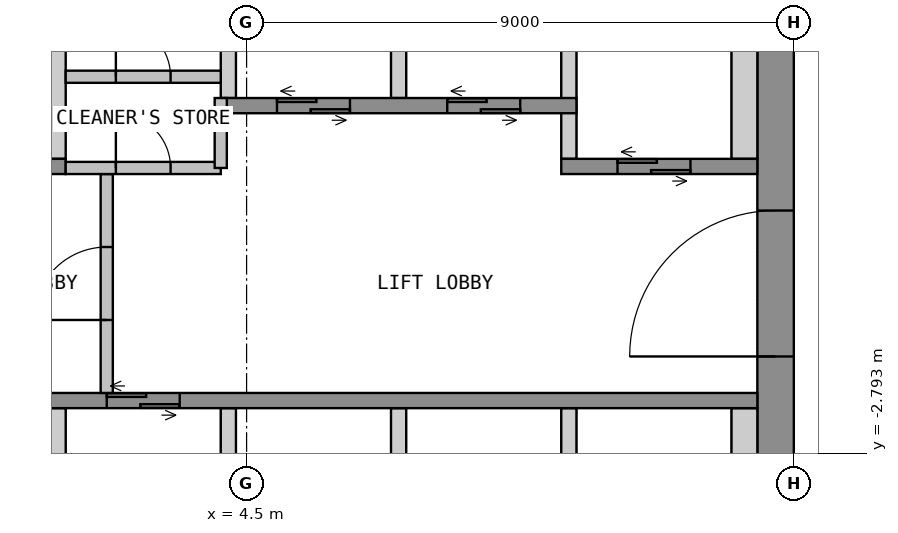
"""IFC4 building model, lengths in metres.
Left out: names, types, materials, properties, quantities, classifications, styles, units other than length and angle.
Written with IfcOpenShell. Run it as: python <this file> out.ifc"""

import sys

from ifc_helpers import new_model, si_unit, direction, frame, frame_2d, origin, place, context, subcontext, project, spatial, polyline, rectangle, outline, extrude, element, fill, save


model = new_model("IFC4")
c1 = context("Model", 3, precision=1e-05, world=origin(), true_north=direction((0.0, 1.0)))
c2 = subcontext(c1, "Body", "Model", "MODEL_VIEW")
j1 = project(units=[si_unit("LENGTHUNIT", "METRE"), si_unit("PLANEANGLEUNIT", "RADIAN")], contexts=[c1])
p1 = place(None, origin())
s1 = spatial("IfcSite", under=j1, at=p1, CompositionType="ELEMENT")
p2 = place(p1, origin())
s2 = spatial("IfcBuilding", under=s1, at=p2, CompositionType="ELEMENT")
p3 = place(p2, frame((0.0, 0.0, 179.4)))
s3 = spatial("IfcBuildingStorey", under=s2, at=p3, CompositionType="ELEMENT", Elevation=179.4)
p4 = place(p3, frame((13.2, -10.65, 0.0), z_axis=(0.0, 0.0, 1.0), x_axis=(0.0, 1.0, 0.0)))
e1 = element("IfcWall", 1, at=p4, inside=s3, PredefinedType="SHEAR", context=c2, shape_type="SweptSolid", body=[
    extrude(rectangle(XDim=21.3, YDim=0.6, at=frame_2d((10.65, 0.0))), origin(), (0.0, 0.0, 1.0), 4.15),
])
p5 = place(p4, frame((9.45, 0.0, 0.0)))
e2 = element("IfcOpeningElement", 2, at=p5, cuts=e1, PredefinedType="OPENING", context=c2, shape_type="SweptSolid", body=[
    extrude(rectangle(XDim=2.4, YDim=2.1, at=frame_2d((1.2, 1.05))), frame((0.0, 0.31, 0.0), z_axis=(0.0, -1.0, 0.0), x_axis=(1.0, 0.0, 0.0)), (0.0, 0.0, 1.0), 0.62),
])
p6 = place(p3, origin())
e3 = element("IfcWall", 3, at=p6, inside=s3, PredefinedType="SHEAR", context=c2, shape_type="SweptSolid", body=[
    extrude(outline(polyline([(1.275, 2.05), (1.525, 2.05), (1.525, 4.75), (1.275, 4.75), (1.275, 2.05)])), origin(), (0.0, 0.0, 1.0), 4.15),
])
p7 = place(p3, origin())
e4 = element("IfcWall", 4, at=p7, inside=s3, PredefinedType="SHEAR", context=c2, shape_type="SweptSolid", body=[
    extrude(outline(polyline([(9.675, 2.05), (9.925, 2.05), (9.925, 4.75), (9.675, 4.75), (9.675, 2.05)])), origin(), (0.0, 0.0, 1.0), 4.15),
])
p8 = place(p3, origin())
e5 = element("IfcWall", 5, at=p8, inside=s3, PredefinedType="SHEAR", context=c2, shape_type="SweptSolid", body=[
    extrude(outline(polyline([(12.475, 2.05), (12.9, 2.05), (12.9, 4.75), (12.475, 4.75), (12.475, 2.05)])), origin(), (0.0, 0.0, 1.0), 4.15),
])
p9 = place(p3, origin())
e6 = element("IfcWall", 6, at=p9, inside=s3, PredefinedType="SHEAR", context=c2, shape_type="SweptSolid", body=[
    extrude(outline(polyline([(4.075, 3.05), (4.325, 3.05), (4.325, 4.75), (4.075, 4.75), (4.075, 3.05)])), origin(), (0.0, 0.0, 1.0), 4.15),
])
p10 = place(p3, origin())
e7 = element("IfcWall", 7, at=p10, inside=s3, PredefinedType="SHEAR", context=c2, shape_type="SweptSolid", body=[
    extrude(outline(polyline([(6.875, 3.05), (7.125, 3.05), (7.125, 4.75), (6.875, 4.75), (6.875, 3.05)])), origin(), (0.0, 0.0, 1.0), 4.15),
])
p11 = place(p3, frame((-1.525, 1.925, 0.0), z_axis=(0.0, 0.0, 1.0), x_axis=(1.0, 0.0, 0.0)))
e8 = element("IfcWall", 8, at=p11, inside=s3, PredefinedType="SHEAR", context=c2, shape_type="SweptSolid", body=[
    extrude(rectangle(XDim=3.05, YDim=0.25, at=frame_2d((1.525, 0.0))), origin(), (0.0, 0.0, 1.0), 4.15),
])
p12 = place(p11, frame((0.925, 0.0, 0.0)))
e9 = element("IfcOpeningElement", 9, at=p12, cuts=e8, PredefinedType="OPENING", context=c2, shape_type="SweptSolid", body=[
    extrude(rectangle(XDim=1.2, YDim=2.1, at=frame_2d((0.6, 1.05))), frame((0.0, 0.135, 0.0), z_axis=(0.0, -1.0, 0.0), x_axis=(1.0, 0.0, 0.0)), (0.0, 0.0, 1.0), 0.27),
])
p13 = place(p3, frame((4.075, 2.925, 0.0), z_axis=(0.0, 0.0, 1.0), x_axis=(1.0, 0.0, 0.0)))
e10 = element("IfcWall", 10, at=p13, inside=s3, PredefinedType="SHEAR", context=c2, shape_type="SweptSolid", body=[
    extrude(rectangle(XDim=5.85, YDim=0.25, at=frame_2d((2.925, 0.0))), origin(), (0.0, 0.0, 1.0), 4.15),
])
p14 = place(p13, frame((0.925, 0.0, 0.0)))
e11 = element("IfcOpeningElement", 11, at=p14, cuts=e10, PredefinedType="OPENING", context=c2, shape_type="SweptSolid", body=[
    extrude(rectangle(XDim=1.2, YDim=2.1, at=frame_2d((0.6, 1.05))), frame((0.0, 0.135, 0.0), z_axis=(0.0, -1.0, 0.0), x_axis=(1.0, 0.0, 0.0)), (0.0, 0.0, 1.0), 0.27),
])
p15 = place(p13, frame((3.725, 0.0, 0.0)))
e12 = element("IfcOpeningElement", 12, at=p15, cuts=e10, PredefinedType="OPENING", context=c2, shape_type="SweptSolid", body=[
    extrude(rectangle(XDim=1.2, YDim=2.1, at=frame_2d((0.6, 1.05))), frame((0.0, 0.135, 0.0), z_axis=(0.0, -1.0, 0.0), x_axis=(1.0, 0.0, 0.0)), (0.0, 0.0, 1.0), 0.27),
])
p16 = place(p3, frame((9.675, 1.925, 0.0), z_axis=(0.0, 0.0, 1.0), x_axis=(1.0, 0.0, 0.0)))
e13 = element("IfcWall", 13, at=p16, inside=s3, PredefinedType="SHEAR", context=c2, shape_type="SweptSolid", body=[
    extrude(rectangle(XDim=3.225, YDim=0.25, at=frame_2d((1.612, 0.0))), origin(), (0.0, 0.0, 1.0), 4.15),
])
p17 = place(p16, frame((0.925, 0.0, 0.0)))
e14 = element("IfcOpeningElement", 14, at=p17, cuts=e13, PredefinedType="OPENING", context=c2, shape_type="SweptSolid", body=[
    extrude(rectangle(XDim=1.2, YDim=2.1, at=frame_2d((0.6, 1.05))), frame((0.0, 0.135, 0.0), z_axis=(0.0, -1.0, 0.0), x_axis=(1.0, 0.0, 0.0)), (0.0, 0.0, 1.0), 0.27),
])
p18 = place(p3, origin())
e15 = element("IfcWall", 15, at=p18, inside=s3, PredefinedType="SHEAR", context=c2, shape_type="SweptSolid", body=[
    extrude(outline(polyline([(1.275, -4.75), (1.525, -4.75), (1.525, -2.05), (1.275, -2.05), (1.275, -4.75)])), origin(), (0.0, 0.0, 1.0), 4.15),
])
p19 = place(p3, origin())
e16 = element("IfcWall", 16, at=p19, inside=s3, PredefinedType="SHEAR", context=c2, shape_type="SweptSolid", body=[
    extrude(outline(polyline([(4.075, -4.75), (4.325, -4.75), (4.325, -2.05), (4.075, -2.05), (4.075, -4.75)])), origin(), (0.0, 0.0, 1.0), 4.15),
])
p20 = place(p3, origin())
e17 = element("IfcWall", 17, at=p20, inside=s3, PredefinedType="SHEAR", context=c2, shape_type="SweptSolid", body=[
    extrude(outline(polyline([(6.875, -4.75), (7.125, -4.75), (7.125, -2.05), (6.875, -2.05), (6.875, -4.75)])), origin(), (0.0, 0.0, 1.0), 4.15),
])
p21 = place(p3, origin())
e18 = element("IfcWall", 18, at=p21, inside=s3, PredefinedType="SHEAR", context=c2, shape_type="SweptSolid", body=[
    extrude(outline(polyline([(9.675, -4.75), (9.925, -4.75), (9.925, -2.05), (9.675, -2.05), (9.675, -4.75)])), origin(), (0.0, 0.0, 1.0), 4.15),
])
p22 = place(p3, origin())
e19 = element("IfcWall", 19, at=p22, inside=s3, PredefinedType="SHEAR", context=c2, shape_type="SweptSolid", body=[
    extrude(outline(polyline([(12.475, -4.75), (12.9, -4.75), (12.9, -2.05), (12.475, -2.05), (12.475, -4.75)])), origin(), (0.0, 0.0, 1.0), 4.15),
])
p23 = place(p3, frame((-1.525, -1.925, 0.0), z_axis=(0.0, 0.0, 1.0), x_axis=(1.0, 0.0, 0.0)))
e20 = element("IfcWall", 20, at=p23, inside=s3, PredefinedType="SHEAR", context=c2, shape_type="SweptSolid", body=[
    extrude(rectangle(XDim=14.425, YDim=0.25, at=frame_2d((7.212, 0.0))), origin(), (0.0, 0.0, 1.0), 4.15),
])
p24 = place(p23, frame((0.925, 0.0, 0.0)))
e21 = element("IfcOpeningElement", 21, at=p24, cuts=e20, PredefinedType="OPENING", context=c2, shape_type="SweptSolid", body=[
    extrude(rectangle(XDim=1.2, YDim=2.1, at=frame_2d((0.6, 1.05))), frame((0.0, 0.135, 0.0), z_axis=(0.0, -1.0, 0.0), x_axis=(1.0, 0.0, 0.0)), (0.0, 0.0, 1.0), 0.27),
])
p25 = place(p23, frame((3.725, 0.0, 0.0)))
e22 = element("IfcOpeningElement", 22, at=p25, cuts=e20, PredefinedType="OPENING", context=c2, shape_type="SweptSolid", body=[
    extrude(rectangle(XDim=1.2, YDim=2.1, at=frame_2d((0.6, 1.05))), frame((0.0, 0.135, 0.0), z_axis=(0.0, -1.0, 0.0), x_axis=(1.0, 0.0, 0.0)), (0.0, 0.0, 1.0), 0.27),
])
p26 = place(p3, frame((2.2, -1.8, 0.0), z_axis=(0.0, 0.0, 1.0), x_axis=(0.0, 1.0, 0.0)))
e23 = element("IfcWall", 23, at=p26, inside=s3, PredefinedType="PARTITIONING", context=c2, shape_type="SweptSolid", body=[
    extrude(rectangle(XDim=3.6, YDim=0.2, at=frame_2d((1.8, 0.0))), origin(), (0.0, 0.0, 1.0), 4.15),
])
p27 = place(p26, frame((1.2, 0.0, 0.0)))
e24 = element("IfcOpeningElement", 24, at=p27, cuts=e23, PredefinedType="OPENING", context=c2, shape_type="SweptSolid", body=[
    extrude(rectangle(XDim=1.2, YDim=2.1, at=frame_2d((0.6, 1.05))), frame((0.0, 0.11, 0.0), z_axis=(0.0, -1.0, 0.0), x_axis=(1.0, 0.0, 0.0)), (0.0, 0.0, 1.0), 0.22),
])
p28 = place(p3, frame((1.525, 3.4, 0.0), z_axis=(0.0, 0.0, 1.0), x_axis=(1.0, 0.0, 0.0)))
e25 = element("IfcWall", 25, at=p28, inside=s3, PredefinedType="PARTITIONING", context=c2, shape_type="SweptSolid", body=[
    extrude(rectangle(XDim=2.55, YDim=0.2, at=frame_2d((1.275, 0.0))), origin(), (0.0, 0.0, 1.0), 4.15),
])
p29 = place(p28, frame((0.825, 0.0, 0.0)))
e26 = element("IfcOpeningElement", 26, at=p29, cuts=e25, PredefinedType="OPENING", context=c2, shape_type="SweptSolid", body=[
    extrude(rectangle(XDim=0.9, YDim=2.1, at=frame_2d((0.45, 1.05))), frame((0.0, 0.11, 0.0), z_axis=(0.0, -1.0, 0.0), x_axis=(1.0, 0.0, 0.0)), (0.0, 0.0, 1.0), 0.22),
])
p30 = place(p3, frame((1.525, 1.9, 0.0), z_axis=(0.0, 0.0, 1.0), x_axis=(1.0, 0.0, 0.0)))
e27 = element("IfcWall", 27, at=p30, inside=s3, PredefinedType="PARTITIONING", context=c2, shape_type="SweptSolid", body=[
    extrude(rectangle(XDim=2.55, YDim=0.2, at=frame_2d((1.275, 0.0))), origin(), (0.0, 0.0, 1.0), 4.15),
])
p31 = place(p30, frame((0.825, 0.0, 0.0)))
e28 = element("IfcOpeningElement", 28, at=p31, cuts=e27, PredefinedType="OPENING", context=c2, shape_type="SweptSolid", body=[
    extrude(rectangle(XDim=0.9, YDim=2.1, at=frame_2d((0.45, 1.05))), frame((0.0, 0.11, 0.0), z_axis=(0.0, -1.0, 0.0), x_axis=(1.0, 0.0, 0.0)), (0.0, 0.0, 1.0), 0.22),
])
p32 = place(p3, frame((4.075, 1.9, 0.0), z_axis=(0.0, 0.0, 1.0), x_axis=(0.0, 1.0, 0.0)))
e29 = element("IfcWall", 29, at=p32, inside=s3, PredefinedType="PARTITIONING", context=c2, shape_type="SweptSolid", body=[
    extrude(rectangle(XDim=1.15, YDim=0.2, at=frame_2d((0.575, 0.0))), origin(), (0.0, 0.0, 1.0), 4.15),
])
p33 = place(p5, origin())
e30 = element("IfcDoor", 30, at=p33, inside=s3, OperationType="DOUBLE_DOOR_DOUBLE_SWING", PredefinedType="DOOR", context=c2, shape_type="SweptSolid", body=[
    extrude(rectangle(XDim=2.4, YDim=2.1, at=frame_2d((1.2, 1.05))), frame((0.0, 0.025, 0.0), z_axis=(0.0, -1.0, 0.0), x_axis=(1.0, 0.0, 0.0)), (0.0, 0.0, 1.0), 0.05),
])
fill(e2, e30)
p34 = place(p14, origin())
e31 = element("IfcDoor", 31, at=p34, inside=s3, OperationType="DOUBLE_DOOR_SLIDING", PredefinedType="DOOR", context=c2, shape_type="SweptSolid", body=[
    extrude(rectangle(XDim=1.2, YDim=2.1, at=frame_2d((0.6, 1.05))), frame((0.0, 0.025, 0.0), z_axis=(0.0, -1.0, 0.0), x_axis=(1.0, 0.0, 0.0)), (0.0, 0.0, 1.0), 0.05),
])
fill(e11, e31)
p35 = place(p15, origin())
e32 = element("IfcDoor", 32, at=p35, inside=s3, OperationType="DOUBLE_DOOR_SLIDING", PredefinedType="DOOR", context=c2, shape_type="SweptSolid", body=[
    extrude(rectangle(XDim=1.2, YDim=2.1, at=frame_2d((0.6, 1.05))), frame((0.0, 0.025, 0.0), z_axis=(0.0, -1.0, 0.0), x_axis=(1.0, 0.0, 0.0)), (0.0, 0.0, 1.0), 0.05),
])
fill(e12, e32)
p36 = place(p17, origin())
e33 = element("IfcDoor", 33, at=p36, inside=s3, OperationType="DOUBLE_DOOR_SLIDING", PredefinedType="DOOR", context=c2, shape_type="SweptSolid", body=[
    extrude(rectangle(XDim=1.2, YDim=2.1, at=frame_2d((0.6, 1.05))), frame((0.0, 0.025, 0.0), z_axis=(0.0, -1.0, 0.0), x_axis=(1.0, 0.0, 0.0)), (0.0, 0.0, 1.0), 0.05),
])
fill(e14, e33)
p37 = place(p25, origin())
e34 = element("IfcDoor", 34, at=p37, inside=s3, OperationType="DOUBLE_DOOR_SLIDING", PredefinedType="DOOR", context=c2, shape_type="SweptSolid", body=[
    extrude(rectangle(XDim=1.2, YDim=2.1, at=frame_2d((0.6, 1.05))), frame((0.0, 0.025, 0.0), z_axis=(0.0, -1.0, 0.0), x_axis=(1.0, 0.0, 0.0)), (0.0, 0.0, 1.0), 0.05),
])
fill(e22, e34)
p38 = place(p27, origin())
e35 = element("IfcDoor", 35, at=p38, inside=s3, OperationType="SINGLE_SWING_LEFT", PredefinedType="DOOR", context=c2, shape_type="SweptSolid", body=[
    extrude(rectangle(XDim=1.2, YDim=2.1, at=frame_2d((0.6, 1.05))), frame((0.0, 0.025, 0.0), z_axis=(0.0, -1.0, 0.0), x_axis=(1.0, 0.0, 0.0)), (0.0, 0.0, 1.0), 0.05),
])
fill(e24, e35)
p39 = place(p29, origin())
e36 = element("IfcDoor", 36, at=p39, inside=s3, OperationType="SINGLE_SWING_LEFT", PredefinedType="DOOR", context=c2, shape_type="SweptSolid", body=[
    extrude(rectangle(XDim=0.9, YDim=2.1, at=frame_2d((0.45, 1.05))), frame((0.0, 0.025, 0.0), z_axis=(0.0, -1.0, 0.0), x_axis=(1.0, 0.0, 0.0)), (0.0, 0.0, 1.0), 0.05),
])
fill(e26, e36)
p40 = place(p31, origin())
e37 = element("IfcDoor", 37, at=p40, inside=s3, OperationType="SINGLE_SWING_LEFT", PredefinedType="DOOR", context=c2, shape_type="SweptSolid", body=[
    extrude(rectangle(XDim=0.9, YDim=2.1, at=frame_2d((0.45, 1.05))), frame((0.0, 0.025, 0.0), z_axis=(0.0, -1.0, 0.0), x_axis=(1.0, 0.0, 0.0)), (0.0, 0.0, 1.0), 0.05),
])
fill(e28, e37)
save(model, sys.argv[1])
